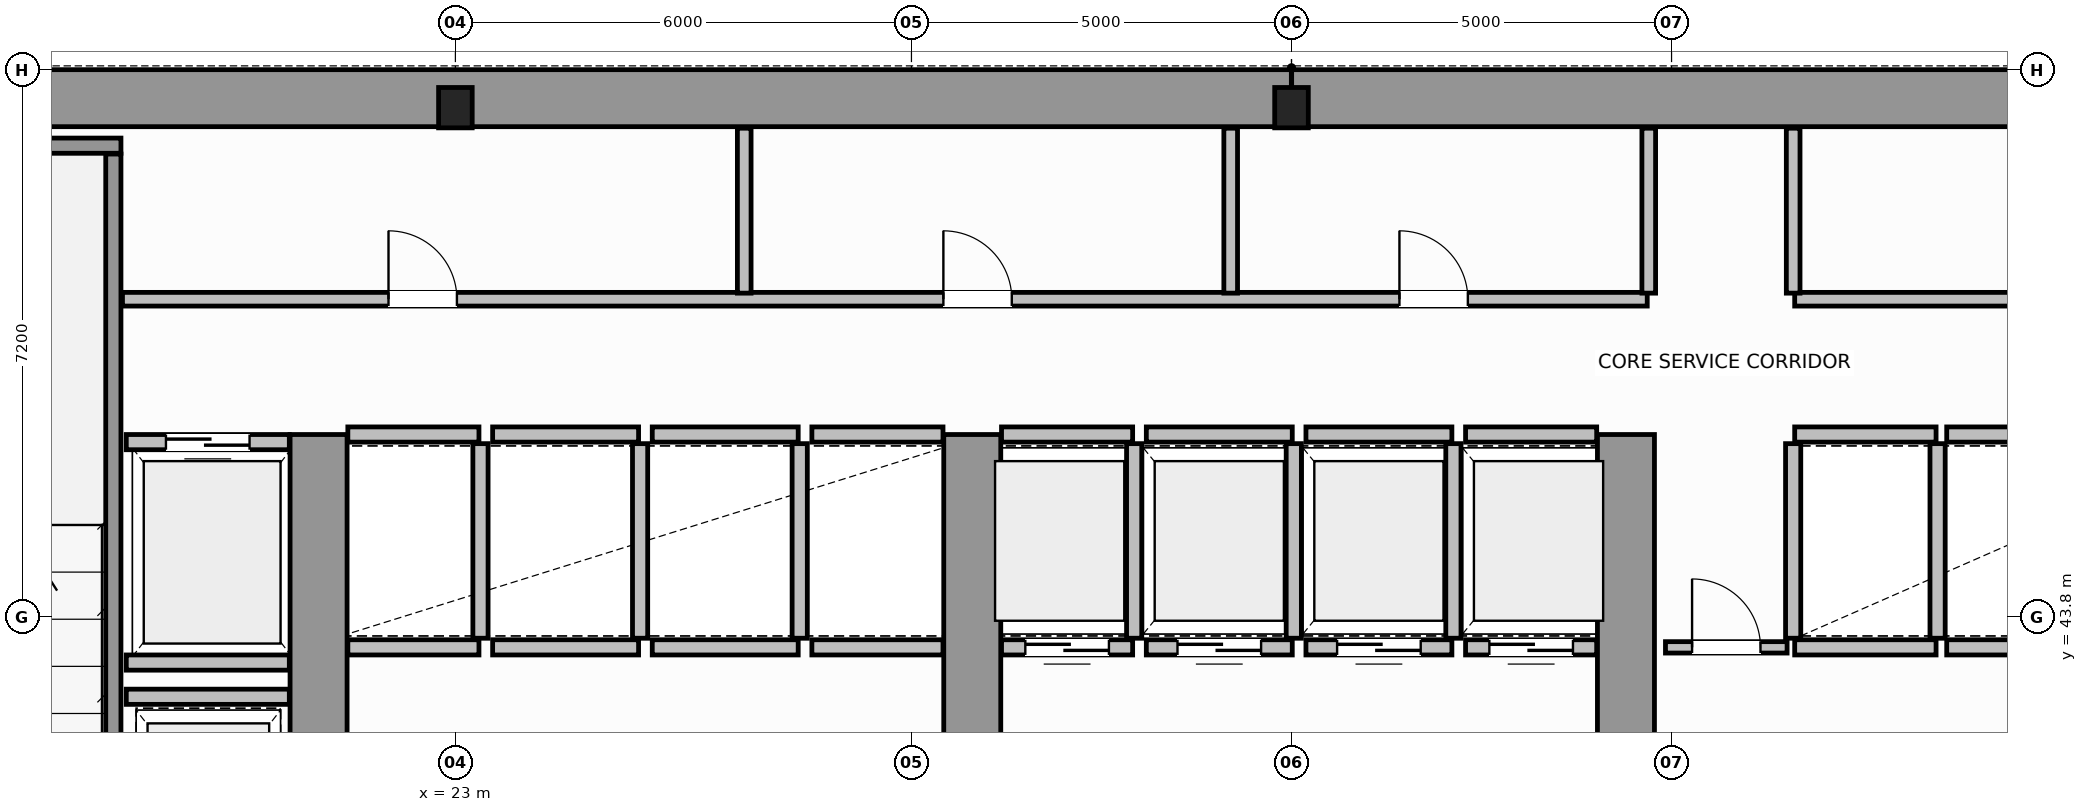
"""IFC4 building model, lengths in metres.
Left out: names, types, materials, properties, quantities, classifications, styles, units other than length and angle.
Written with IfcOpenShell. Run it as: python <this file> out.ifc"""

import sys

from ifc_helpers import new_model, si_unit, direction, frame, frame_2d, origin, origin_2d, place, context, subcontext, project, spatial, rectangle, i_section, extrude, source, transform, mapped, element, fill, save


model = new_model("IFC4")
c1 = context("Model", 3, precision=1e-05, world=origin(), true_north=direction((0.0, 1.0)))
c2 = subcontext(c1, "Body", "Model", "MODEL_VIEW")
j1 = project(units=[si_unit("LENGTHUNIT", "METRE"), si_unit("PLANEANGLEUNIT", "RADIAN")], contexts=[c1])
p1 = place(None, origin())
s1 = spatial("IfcSite", under=j1, at=p1, CompositionType="ELEMENT")
p2 = place(p1, origin())
s2 = spatial("IfcBuilding", under=s1, at=p2, CompositionType="ELEMENT")
p3 = place(p2, frame((0.0, 0.0, 103.4)))
s3 = spatial("IfcBuildingStorey", under=s2, at=p3, CompositionType="ELEMENT", Elevation=103.4)
m1 = source(origin(), c2, "Body", "SweptSolid", [
    extrude(i_section(OverallWidth=0.442, OverallDepth=0.531, WebThickness=0.065, FlangeThickness=0.076, FilletRadius=0.015, at=origin_2d()), origin(), (0.0, 0.0, 1.0), 3.8),
])
for number, where, z_axis, x_axis in (
    (1, (23.0, 50.5, 0.0), (0.0, 0.0, 1.0), (1.0, 0.0, 0.0)),
    (2, (34.0, 50.5, 0.0), (0.0, 0.0, 1.0), (1.0, 0.0, 0.0)),
):
    element("IfcColumn", number, at=place(p3, frame(where, z_axis=z_axis, x_axis=x_axis)), inside=s3, PredefinedType="COLUMN", context=c2, shape_type="MappedRepresentation", body=[
        mapped(m1, transform((0.0, 0.0, 0.0), scale=1.0)),
    ])
for number, where, z_axis, x_axis in (
    (3, (14.379, 50.625, 0.0), (0.0, 0.0, 1.0), (1.0, 0.0, 0.0)),
    (4, (34.002, 50.625, 0.0), (0.0, 0.0, 1.0), (1.0, 0.0, 0.0)),
):
    element("IfcWall", number, at=place(p3, frame(where, z_axis=z_axis, x_axis=x_axis)), inside=s3, PredefinedType="SHEAR", context=c2, shape_type="SweptSolid", body=[
        extrude(rectangle(XDim=19.619, YDim=0.75, at=frame_2d((9.81, 0.0))), origin(), (0.0, 0.0, 1.0), 3.8),
    ])
for number, where, z_axis, x_axis in (
    (5, (21.2, 36.895, 0.0), (0.0, 0.0, 1.0), (0.0, 1.0, 0.0)),
    (6, (29.8, 36.895, 0.0), (0.0, 0.0, 1.0), (0.0, 1.0, 0.0)),
    (7, (38.4, 36.895, 0.0), (0.0, 0.0, 1.0), (0.0, 1.0, 0.0)),
):
    element("IfcWall", number, at=place(p3, frame(where, z_axis=z_axis, x_axis=x_axis)), inside=s3, PredefinedType="SHEAR", context=c2, shape_type="SweptSolid", body=[
        extrude(rectangle(XDim=9.305, YDim=0.75, at=frame_2d((4.652, 0.0))), origin(), (0.0, 0.0, 1.0), 3.8),
    ])
p4 = place(p3, frame((14.375, 50.0, 0.0), z_axis=(0.0, 0.0, 1.0), x_axis=(1.0, 0.0, 0.0)))
e8 = element("IfcWall", 8, at=p4, inside=s3, PredefinedType="SOLIDWALL", context=c2, shape_type="SweptSolid", body=[
    extrude(rectangle(XDim=4.225, YDim=0.2, at=frame_2d((2.113, 0.0))), origin(), (0.0, 0.0, 1.0), 3.8),
])
p5 = place(p3, frame((18.5, 39.96, 0.0), z_axis=(0.0, 0.0, 1.0), x_axis=(0.0, 1.0, 0.0)))
e9 = element("IfcWall", 9, at=p5, inside=s3, PredefinedType="SOLIDWALL", context=c2, shape_type="SweptSolid", body=[
    extrude(rectangle(XDim=9.93, YDim=0.2, at=frame_2d((4.965, 0.0))), origin(), (0.0, 0.0, 1.0), 3.8),
])
for number, where, z_axis, x_axis in (
    (10, (21.585, 43.4, 0.0), (0.0, 0.0, 1.0), (1.0, 0.0, 0.0)),
    (11, (21.585, 46.2, 0.0), (0.0, 0.0, 1.0), (1.0, 0.0, 0.0)),
):
    element("IfcWall", number, at=place(p3, frame(where, z_axis=z_axis, x_axis=x_axis)), inside=s3, PredefinedType="SOLIDWALL", context=c2, shape_type="SweptSolid", body=[
        extrude(rectangle(XDim=1.725, YDim=0.2, at=frame_2d((0.863, 0.0))), origin(), (0.0, 0.0, 1.0), 3.58),
    ])
p6 = place(p3, frame((23.33, 43.52, 0.0), z_axis=(0.0, 0.0, 1.0), x_axis=(0.0, 1.0, 0.0)))
e12 = element("IfcWall", 12, at=p6, inside=s3, PredefinedType="SOLIDWALL", context=c2, shape_type="SweptSolid", body=[
    extrude(rectangle(XDim=2.56, YDim=0.2, at=frame_2d((1.28, 0.0))), origin(), (0.0, 0.0, 1.0), 3.58),
])
for number, where, z_axis, x_axis in (
    (13, (23.49, 43.4, 0.0), (0.0, 0.0, 1.0), (1.0, 0.0, 0.0)),
    (14, (23.49, 46.2, 0.0), (0.0, 0.0, 1.0), (1.0, 0.0, 0.0)),
):
    element("IfcWall", number, at=place(p3, frame(where, z_axis=z_axis, x_axis=x_axis)), inside=s3, PredefinedType="SOLIDWALL", context=c2, shape_type="SweptSolid", body=[
        extrude(rectangle(XDim=1.92, YDim=0.2, at=frame_2d((0.96, 0.0))), origin(), (0.0, 0.0, 1.0), 3.58),
    ])
p7 = place(p3, frame((25.43, 43.52, 0.0), z_axis=(0.0, 0.0, 1.0), x_axis=(0.0, 1.0, 0.0)))
e15 = element("IfcWall", 15, at=p7, inside=s3, PredefinedType="SOLIDWALL", context=c2, shape_type="SweptSolid", body=[
    extrude(rectangle(XDim=2.56, YDim=0.2, at=frame_2d((1.28, 0.0))), origin(), (0.0, 0.0, 1.0), 3.58),
])
for number, where, z_axis, x_axis in (
    (16, (25.59, 43.4, 0.0), (0.0, 0.0, 1.0), (1.0, 0.0, 0.0)),
    (17, (25.59, 46.2, 0.0), (0.0, 0.0, 1.0), (1.0, 0.0, 0.0)),
):
    element("IfcWall", number, at=place(p3, frame(where, z_axis=z_axis, x_axis=x_axis)), inside=s3, PredefinedType="SOLIDWALL", context=c2, shape_type="SweptSolid", body=[
        extrude(rectangle(XDim=1.92, YDim=0.2, at=frame_2d((0.96, 0.0))), origin(), (0.0, 0.0, 1.0), 3.58),
    ])
p8 = place(p3, frame((27.53, 43.52, 0.0), z_axis=(0.0, 0.0, 1.0), x_axis=(0.0, 1.0, 0.0)))
e18 = element("IfcWall", 18, at=p8, inside=s3, PredefinedType="SOLIDWALL", context=c2, shape_type="SweptSolid", body=[
    extrude(rectangle(XDim=2.56, YDim=0.2, at=frame_2d((1.28, 0.0))), origin(), (0.0, 0.0, 1.0), 3.58),
])
for number, where, z_axis, x_axis in (
    (19, (27.69, 43.4, 0.0), (0.0, 0.0, 1.0), (1.0, 0.0, 0.0)),
    (20, (27.69, 46.2, 0.0), (0.0, 0.0, 1.0), (1.0, 0.0, 0.0)),
):
    element("IfcWall", number, at=place(p3, frame(where, z_axis=z_axis, x_axis=x_axis)), inside=s3, PredefinedType="SOLIDWALL", context=c2, shape_type="SweptSolid", body=[
        extrude(rectangle(XDim=1.725, YDim=0.2, at=frame_2d((0.863, 0.0))), origin(), (0.0, 0.0, 1.0), 3.58),
    ])
p9 = place(p3, frame((30.185, 43.4, 0.0), z_axis=(0.0, 0.0, 1.0), x_axis=(1.0, 0.0, 0.0)))
e21 = element("IfcWall", 21, at=p9, inside=s3, PredefinedType="SOLIDWALL", context=c2, shape_type="SweptSolid", body=[
    extrude(rectangle(XDim=1.725, YDim=0.2, at=frame_2d((0.862, 0.0))), origin(), (0.0, 0.0, 1.0), 3.58),
])
p10 = place(p9, frame((0.313, 0.0, 0.0)))
e22 = element("IfcOpeningElement", 22, at=p10, cuts=e21, PredefinedType="OPENING", context=c2, shape_type="SweptSolid", body=[
    extrude(rectangle(XDim=1.1, YDim=2.15, at=frame_2d((0.55, 1.075))), frame((0.0, 0.11, 0.0), z_axis=(0.0, -1.0, 0.0), x_axis=(1.0, 0.0, 0.0)), (0.0, 0.0, 1.0), 0.22),
])
p11 = place(p3, frame((30.185, 46.2, 0.0), z_axis=(0.0, 0.0, 1.0), x_axis=(1.0, 0.0, 0.0)))
e23 = element("IfcWall", 23, at=p11, inside=s3, PredefinedType="SOLIDWALL", context=c2, shape_type="SweptSolid", body=[
    extrude(rectangle(XDim=1.725, YDim=0.2, at=frame_2d((0.862, 0.0))), origin(), (0.0, 0.0, 1.0), 3.58),
])
p12 = place(p3, frame((31.93, 43.52, 0.0), z_axis=(0.0, 0.0, 1.0), x_axis=(0.0, 1.0, 0.0)))
e24 = element("IfcWall", 24, at=p12, inside=s3, PredefinedType="SOLIDWALL", context=c2, shape_type="SweptSolid", body=[
    extrude(rectangle(XDim=2.56, YDim=0.2, at=frame_2d((1.28, 0.0))), origin(), (0.0, 0.0, 1.0), 3.58),
])
p13 = place(p3, frame((32.09, 43.4, 0.0), z_axis=(0.0, 0.0, 1.0), x_axis=(1.0, 0.0, 0.0)))
e25 = element("IfcWall", 25, at=p13, inside=s3, PredefinedType="SOLIDWALL", context=c2, shape_type="SweptSolid", body=[
    extrude(rectangle(XDim=1.92, YDim=0.2, at=frame_2d((0.96, 0.0))), origin(), (0.0, 0.0, 1.0), 3.58),
])
p14 = place(p13, frame((0.41, 0.0, 0.0)))
e26 = element("IfcOpeningElement", 26, at=p14, cuts=e25, PredefinedType="OPENING", context=c2, shape_type="SweptSolid", body=[
    extrude(rectangle(XDim=1.1, YDim=2.15, at=frame_2d((0.55, 1.075))), frame((0.0, 0.11, 0.0), z_axis=(0.0, -1.0, 0.0), x_axis=(1.0, 0.0, 0.0)), (0.0, 0.0, 1.0), 0.22),
])
p15 = place(p3, frame((32.09, 46.2, 0.0), z_axis=(0.0, 0.0, 1.0), x_axis=(1.0, 0.0, 0.0)))
e27 = element("IfcWall", 27, at=p15, inside=s3, PredefinedType="SOLIDWALL", context=c2, shape_type="SweptSolid", body=[
    extrude(rectangle(XDim=1.92, YDim=0.2, at=frame_2d((0.96, 0.0))), origin(), (0.0, 0.0, 1.0), 3.58),
])
p16 = place(p3, frame((34.03, 43.52, 0.0), z_axis=(0.0, 0.0, 1.0), x_axis=(0.0, 1.0, 0.0)))
e28 = element("IfcWall", 28, at=p16, inside=s3, PredefinedType="SOLIDWALL", context=c2, shape_type="SweptSolid", body=[
    extrude(rectangle(XDim=2.56, YDim=0.2, at=frame_2d((1.28, 0.0))), origin(), (0.0, 0.0, 1.0), 3.58),
])
p17 = place(p3, frame((34.19, 43.4, 0.0), z_axis=(0.0, 0.0, 1.0), x_axis=(1.0, 0.0, 0.0)))
e29 = element("IfcWall", 29, at=p17, inside=s3, PredefinedType="SOLIDWALL", context=c2, shape_type="SweptSolid", body=[
    extrude(rectangle(XDim=1.92, YDim=0.2, at=frame_2d((0.96, 0.0))), origin(), (0.0, 0.0, 1.0), 3.58),
])
p18 = place(p17, frame((0.41, 0.0, 0.0)))
e30 = element("IfcOpeningElement", 30, at=p18, cuts=e29, PredefinedType="OPENING", context=c2, shape_type="SweptSolid", body=[
    extrude(rectangle(XDim=1.1, YDim=2.15, at=frame_2d((0.55, 1.075))), frame((0.0, 0.11, 0.0), z_axis=(0.0, -1.0, 0.0), x_axis=(1.0, 0.0, 0.0)), (0.0, 0.0, 1.0), 0.22),
])
p19 = place(p3, frame((34.19, 46.2, 0.0), z_axis=(0.0, 0.0, 1.0), x_axis=(1.0, 0.0, 0.0)))
e31 = element("IfcWall", 31, at=p19, inside=s3, PredefinedType="SOLIDWALL", context=c2, shape_type="SweptSolid", body=[
    extrude(rectangle(XDim=1.92, YDim=0.2, at=frame_2d((0.96, 0.0))), origin(), (0.0, 0.0, 1.0), 3.58),
])
p20 = place(p3, frame((36.13, 43.52, 0.0), z_axis=(0.0, 0.0, 1.0), x_axis=(0.0, 1.0, 0.0)))
e32 = element("IfcWall", 32, at=p20, inside=s3, PredefinedType="SOLIDWALL", context=c2, shape_type="SweptSolid", body=[
    extrude(rectangle(XDim=2.56, YDim=0.2, at=frame_2d((1.28, 0.0))), origin(), (0.0, 0.0, 1.0), 3.58),
])
p21 = place(p3, frame((36.29, 43.4, 0.0), z_axis=(0.0, 0.0, 1.0), x_axis=(1.0, 0.0, 0.0)))
e33 = element("IfcWall", 33, at=p21, inside=s3, PredefinedType="SOLIDWALL", context=c2, shape_type="SweptSolid", body=[
    extrude(rectangle(XDim=1.725, YDim=0.2, at=frame_2d((0.862, 0.0))), origin(), (0.0, 0.0, 1.0), 3.58),
])
p22 = place(p21, frame((0.313, 0.0, 0.0)))
e34 = element("IfcOpeningElement", 34, at=p22, cuts=e33, PredefinedType="OPENING", context=c2, shape_type="SweptSolid", body=[
    extrude(rectangle(XDim=1.1, YDim=2.15, at=frame_2d((0.55, 1.075))), frame((0.0, 0.11, 0.0), z_axis=(0.0, -1.0, 0.0), x_axis=(1.0, 0.0, 0.0)), (0.0, 0.0, 1.0), 0.22),
])
p23 = place(p3, frame((36.29, 46.2, 0.0), z_axis=(0.0, 0.0, 1.0), x_axis=(1.0, 0.0, 0.0)))
e35 = element("IfcWall", 35, at=p23, inside=s3, PredefinedType="SOLIDWALL", context=c2, shape_type="SweptSolid", body=[
    extrude(rectangle(XDim=1.725, YDim=0.2, at=frame_2d((0.862, 0.0))), origin(), (0.0, 0.0, 1.0), 3.58),
])
for number, where, z_axis, x_axis in (
    (36, (40.62, 43.4, 0.0), (0.0, 0.0, 1.0), (1.0, 0.0, 0.0)),
    (37, (40.62, 46.2, 0.0), (0.0, 0.0, 1.0), (1.0, 0.0, 0.0)),
):
    element("IfcWall", number, at=place(p3, frame(where, z_axis=z_axis, x_axis=x_axis)), inside=s3, PredefinedType="SOLIDWALL", context=c2, shape_type="SweptSolid", body=[
        extrude(rectangle(XDim=1.86, YDim=0.2, at=frame_2d((0.93, 0.0))), origin(), (0.0, 0.0, 1.0), 3.58),
    ])
for number, where, z_axis, x_axis in (
    (38, (40.6, 43.52, 0.0), (0.0, 0.0, 1.0), (0.0, 1.0, 0.0)),
    (39, (42.5, 43.52, 0.0), (0.0, 0.0, 1.0), (0.0, 1.0, 0.0)),
):
    element("IfcWall", number, at=place(p3, frame(where, z_axis=z_axis, x_axis=x_axis)), inside=s3, PredefinedType="SOLIDWALL", context=c2, shape_type="SweptSolid", body=[
        extrude(rectangle(XDim=2.56, YDim=0.2, at=frame_2d((1.28, 0.0))), origin(), (0.0, 0.0, 1.0), 3.58),
    ])
for number, where, z_axis, x_axis in (
    (40, (42.62, 43.4, 0.0), (0.0, 0.0, 1.0), (1.0, 0.0, 0.0)),
    (41, (42.62, 46.2, 0.0), (0.0, 0.0, 1.0), (1.0, 0.0, 0.0)),
):
    element("IfcWall", number, at=place(p3, frame(where, z_axis=z_axis, x_axis=x_axis)), inside=s3, PredefinedType="SOLIDWALL", context=c2, shape_type="SweptSolid", body=[
        extrude(rectangle(XDim=1.86, YDim=0.2, at=frame_2d((0.93, 0.0))), origin(), (0.0, 0.0, 1.0), 3.58),
    ])
p24 = place(p3, frame((18.67, 46.1, 0.0), z_axis=(0.0, 0.0, 1.0), x_axis=(1.0, 0.0, 0.0)))
e42 = element("IfcWall", 42, at=p24, inside=s3, PredefinedType="SOLIDWALL", context=c2, shape_type="SweptSolid", body=[
    extrude(rectangle(XDim=2.145, YDim=0.2, at=frame_2d((1.073, 0.0))), origin(), (0.0, 0.0, 1.0), 3.58),
])
p25 = place(p24, frame((0.522, 0.0, 0.0)))
e43 = element("IfcOpeningElement", 43, at=p25, cuts=e42, PredefinedType="OPENING", context=c2, shape_type="SweptSolid", body=[
    extrude(rectangle(XDim=1.1, YDim=2.15, at=frame_2d((0.55, 1.075))), frame((0.0, 0.11, 0.0), z_axis=(0.0, -1.0, 0.0), x_axis=(1.0, 0.0, 0.0)), (0.0, 0.0, 1.0), 0.22),
])
for number, where, z_axis, x_axis in (
    (44, (18.67, 43.2, 0.0), (0.0, 0.0, 1.0), (1.0, 0.0, 0.0)),
    (45, (18.67, 42.75, 0.0), (0.0, 0.0, 1.0), (1.0, 0.0, 0.0)),
):
    element("IfcWall", number, at=place(p3, frame(where, z_axis=z_axis, x_axis=x_axis)), inside=s3, PredefinedType="SOLIDWALL", context=c2, shape_type="SweptSolid", body=[
        extrude(rectangle(XDim=2.145, YDim=0.2, at=frame_2d((1.073, 0.0))), origin(), (0.0, 0.0, 1.0), 3.58),
    ])
p26 = place(p3, frame((38.92, 43.4, 0.0), z_axis=(0.0, 0.0, 1.0), x_axis=(1.0, 0.0, 0.0)))
e46 = element("IfcWall", 46, at=p26, inside=s3, PredefinedType="PARTITIONING", context=c2, shape_type="SweptSolid", body=[
    extrude(rectangle(XDim=1.6, YDim=0.15, at=frame_2d((0.8, 0.0))), origin(), (0.0, 0.0, 1.0), 3.58),
])
p27 = place(p26, frame((0.35, 0.0, 0.0)))
e47 = element("IfcOpeningElement", 47, at=p27, cuts=e46, PredefinedType="OPENING", context=c2, shape_type="SweptSolid", body=[
    extrude(rectangle(XDim=0.9, YDim=2.1, at=frame_2d((0.45, 1.05))), frame((0.0, 0.085, 0.0), z_axis=(0.0, -1.0, 0.0), x_axis=(1.0, 0.0, 0.0)), (0.0, 0.0, 1.0), 0.17),
])
p28 = place(p3, frame((18.62, 47.98, 0.0), z_axis=(0.0, 0.0, 1.0), x_axis=(1.0, 0.0, 0.0)))
e48 = element("IfcWall", 48, at=p28, inside=s3, PredefinedType="PLUMBINGWALL", context=c2, shape_type="SweptSolid", body=[
    extrude(rectangle(XDim=20.06, YDim=0.18, at=frame_2d((10.03, 0.0))), origin(), (0.0, 0.0, 1.0), 3.58),
])
p29 = place(p28, frame((3.5, 0.0, 0.0)))
e49 = element("IfcOpeningElement", 49, at=p29, cuts=e48, PredefinedType="OPENING", context=c2, shape_type="SweptSolid", body=[
    extrude(rectangle(XDim=0.9, YDim=2.15, at=frame_2d((0.45, 1.075))), frame((0.0, 0.1, 0.0), z_axis=(0.0, -1.0, 0.0), x_axis=(1.0, 0.0, 0.0)), (0.0, 0.0, 1.0), 0.2),
])
p30 = place(p28, frame((10.8, 0.0, 0.0)))
e50 = element("IfcOpeningElement", 50, at=p30, cuts=e48, PredefinedType="OPENING", context=c2, shape_type="SweptSolid", body=[
    extrude(rectangle(XDim=0.9, YDim=2.15, at=frame_2d((0.45, 1.075))), frame((0.0, 0.1, 0.0), z_axis=(0.0, -1.0, 0.0), x_axis=(1.0, 0.0, 0.0)), (0.0, 0.0, 1.0), 0.2),
])
p31 = place(p28, frame((16.8, 0.0, 0.0)))
e51 = element("IfcOpeningElement", 51, at=p31, cuts=e48, PredefinedType="OPENING", context=c2, shape_type="SweptSolid", body=[
    extrude(rectangle(XDim=0.9, YDim=2.15, at=frame_2d((0.45, 1.075))), frame((0.0, 0.1, 0.0), z_axis=(0.0, -1.0, 0.0), x_axis=(1.0, 0.0, 0.0)), (0.0, 0.0, 1.0), 0.2),
])
p32 = place(p3, frame((40.62, 47.98, 0.0), z_axis=(0.0, 0.0, 1.0), x_axis=(1.0, 0.0, 0.0)))
e52 = element("IfcWall", 52, at=p32, inside=s3, PredefinedType="PLUMBINGWALL", context=c2, shape_type="SweptSolid", body=[
    extrude(rectangle(XDim=8.76, YDim=0.18, at=frame_2d((4.38, 0.0))), origin(), (0.0, 0.0, 1.0), 3.58),
])
p33 = place(p32, frame((3.8, 0.0, 0.0)))
e53 = element("IfcOpeningElement", 53, at=p33, cuts=e52, PredefinedType="OPENING", context=c2, shape_type="SweptSolid", body=[
    extrude(rectangle(XDim=0.9, YDim=2.15, at=frame_2d((0.45, 1.075))), frame((0.0, 0.1, 0.0), z_axis=(0.0, -1.0, 0.0), x_axis=(1.0, 0.0, 0.0)), (0.0, 0.0, 1.0), 0.2),
])
for number, where, z_axis, x_axis in (
    (54, (26.8, 48.06, 0.0), (0.0, 0.0, 1.0), (0.0, 1.0, 0.0)),
    (55, (33.2, 48.06, 0.0), (0.0, 0.0, 1.0), (0.0, 1.0, 0.0)),
    (56, (38.7, 48.06, 0.0), (0.0, 0.0, 1.0), (0.0, 1.0, 0.0)),
    (57, (40.6, 48.06, 0.0), (0.0, 0.0, 1.0), (0.0, 1.0, 0.0)),
):
    element("IfcWall", number, at=place(p3, frame(where, z_axis=z_axis, x_axis=x_axis)), inside=s3, PredefinedType="PLUMBINGWALL", context=c2, shape_type="SweptSolid", body=[
        extrude(rectangle(XDim=2.17, YDim=0.18, at=frame_2d((1.085, 0.0))), origin(), (0.0, 0.0, 1.0), 3.58),
    ])
m2 = source(origin(), c2, "Body", "SweptSolid", [
    extrude(rectangle(XDim=1.1, YDim=2.15, at=frame_2d((0.55, 1.075))), frame((0.0, 0.025, 0.0), z_axis=(0.0, -1.0, 0.0), x_axis=(1.0, 0.0, 0.0)), (0.0, 0.0, 1.0), 0.05),
])
p34 = place(p10, origin())
e58 = element("IfcDoor", 58, at=p34, inside=s3, OperationType="DOUBLE_DOOR_SLIDING", PredefinedType="DOOR", context=c2, shape_type="MappedRepresentation", body=[
    mapped(m2, transform((0.0, 0.0, 0.0), scale=1.0)),
])
fill(e22, e58)
p35 = place(p14, origin())
e59 = element("IfcDoor", 59, at=p35, inside=s3, OperationType="DOUBLE_DOOR_SLIDING", PredefinedType="DOOR", context=c2, shape_type="MappedRepresentation", body=[
    mapped(m2, transform((0.0, 0.0, 0.0), scale=1.0)),
])
fill(e26, e59)
p36 = place(p18, origin())
e60 = element("IfcDoor", 60, at=p36, inside=s3, OperationType="DOUBLE_DOOR_SLIDING", PredefinedType="DOOR", context=c2, shape_type="MappedRepresentation", body=[
    mapped(m2, transform((0.0, 0.0, 0.0), scale=1.0)),
])
fill(e30, e60)
p37 = place(p22, origin())
e61 = element("IfcDoor", 61, at=p37, inside=s3, OperationType="DOUBLE_DOOR_SLIDING", PredefinedType="DOOR", context=c2, shape_type="MappedRepresentation", body=[
    mapped(m2, transform((0.0, 0.0, 0.0), scale=1.0)),
])
fill(e34, e61)
p38 = place(p25, origin())
e62 = element("IfcDoor", 62, at=p38, inside=s3, OperationType="DOUBLE_DOOR_SLIDING", PredefinedType="DOOR", context=c2, shape_type="MappedRepresentation", body=[
    mapped(m2, transform((0.0, 0.0, 0.0), scale=1.0)),
])
fill(e43, e62)
m3 = source(origin(), c2, "Body", "SweptSolid", [
    extrude(rectangle(XDim=0.9, YDim=2.1, at=frame_2d((0.45, 1.05))), frame((0.0, 0.025, 0.0), z_axis=(0.0, -1.0, 0.0), x_axis=(1.0, 0.0, 0.0)), (0.0, 0.0, 1.0), 0.05),
])
p39 = place(p27, origin())
e63 = element("IfcDoor", 63, at=p39, inside=s3, OperationType="SINGLE_SWING_LEFT", PredefinedType="DOOR", context=c2, shape_type="MappedRepresentation", body=[
    mapped(m3, transform((0.0, 0.0, 0.0), scale=1.0)),
])
fill(e47, e63)
m4 = source(origin(), c2, "Body", "SweptSolid", [
    extrude(rectangle(XDim=0.9, YDim=2.15, at=frame_2d((0.45, 1.075))), frame((0.0, 0.025, 0.0), z_axis=(0.0, -1.0, 0.0), x_axis=(1.0, 0.0, 0.0)), (0.0, 0.0, 1.0), 0.05),
])
p40 = place(p29, origin())
e64 = element("IfcDoor", 64, at=p40, inside=s3, OperationType="SINGLE_SWING_LEFT", PredefinedType="DOOR", context=c2, shape_type="MappedRepresentation", body=[
    mapped(m4, transform((0.0, 0.0, 0.0), scale=1.0)),
])
fill(e49, e64)
p41 = place(p30, origin())
e65 = element("IfcDoor", 65, at=p41, inside=s3, OperationType="SINGLE_SWING_RIGHT", PredefinedType="DOOR", context=c2, shape_type="MappedRepresentation", body=[
    mapped(m4, transform((0.0, 0.0, 0.0), scale=1.0)),
])
fill(e50, e65)
p42 = place(p31, origin())
e66 = element("IfcDoor", 66, at=p42, inside=s3, OperationType="SINGLE_SWING_LEFT", PredefinedType="DOOR", context=c2, shape_type="MappedRepresentation", body=[
    mapped(m4, transform((0.0, 0.0, 0.0), scale=1.0)),
])
fill(e51, e66)
save(model, sys.argv[1])
